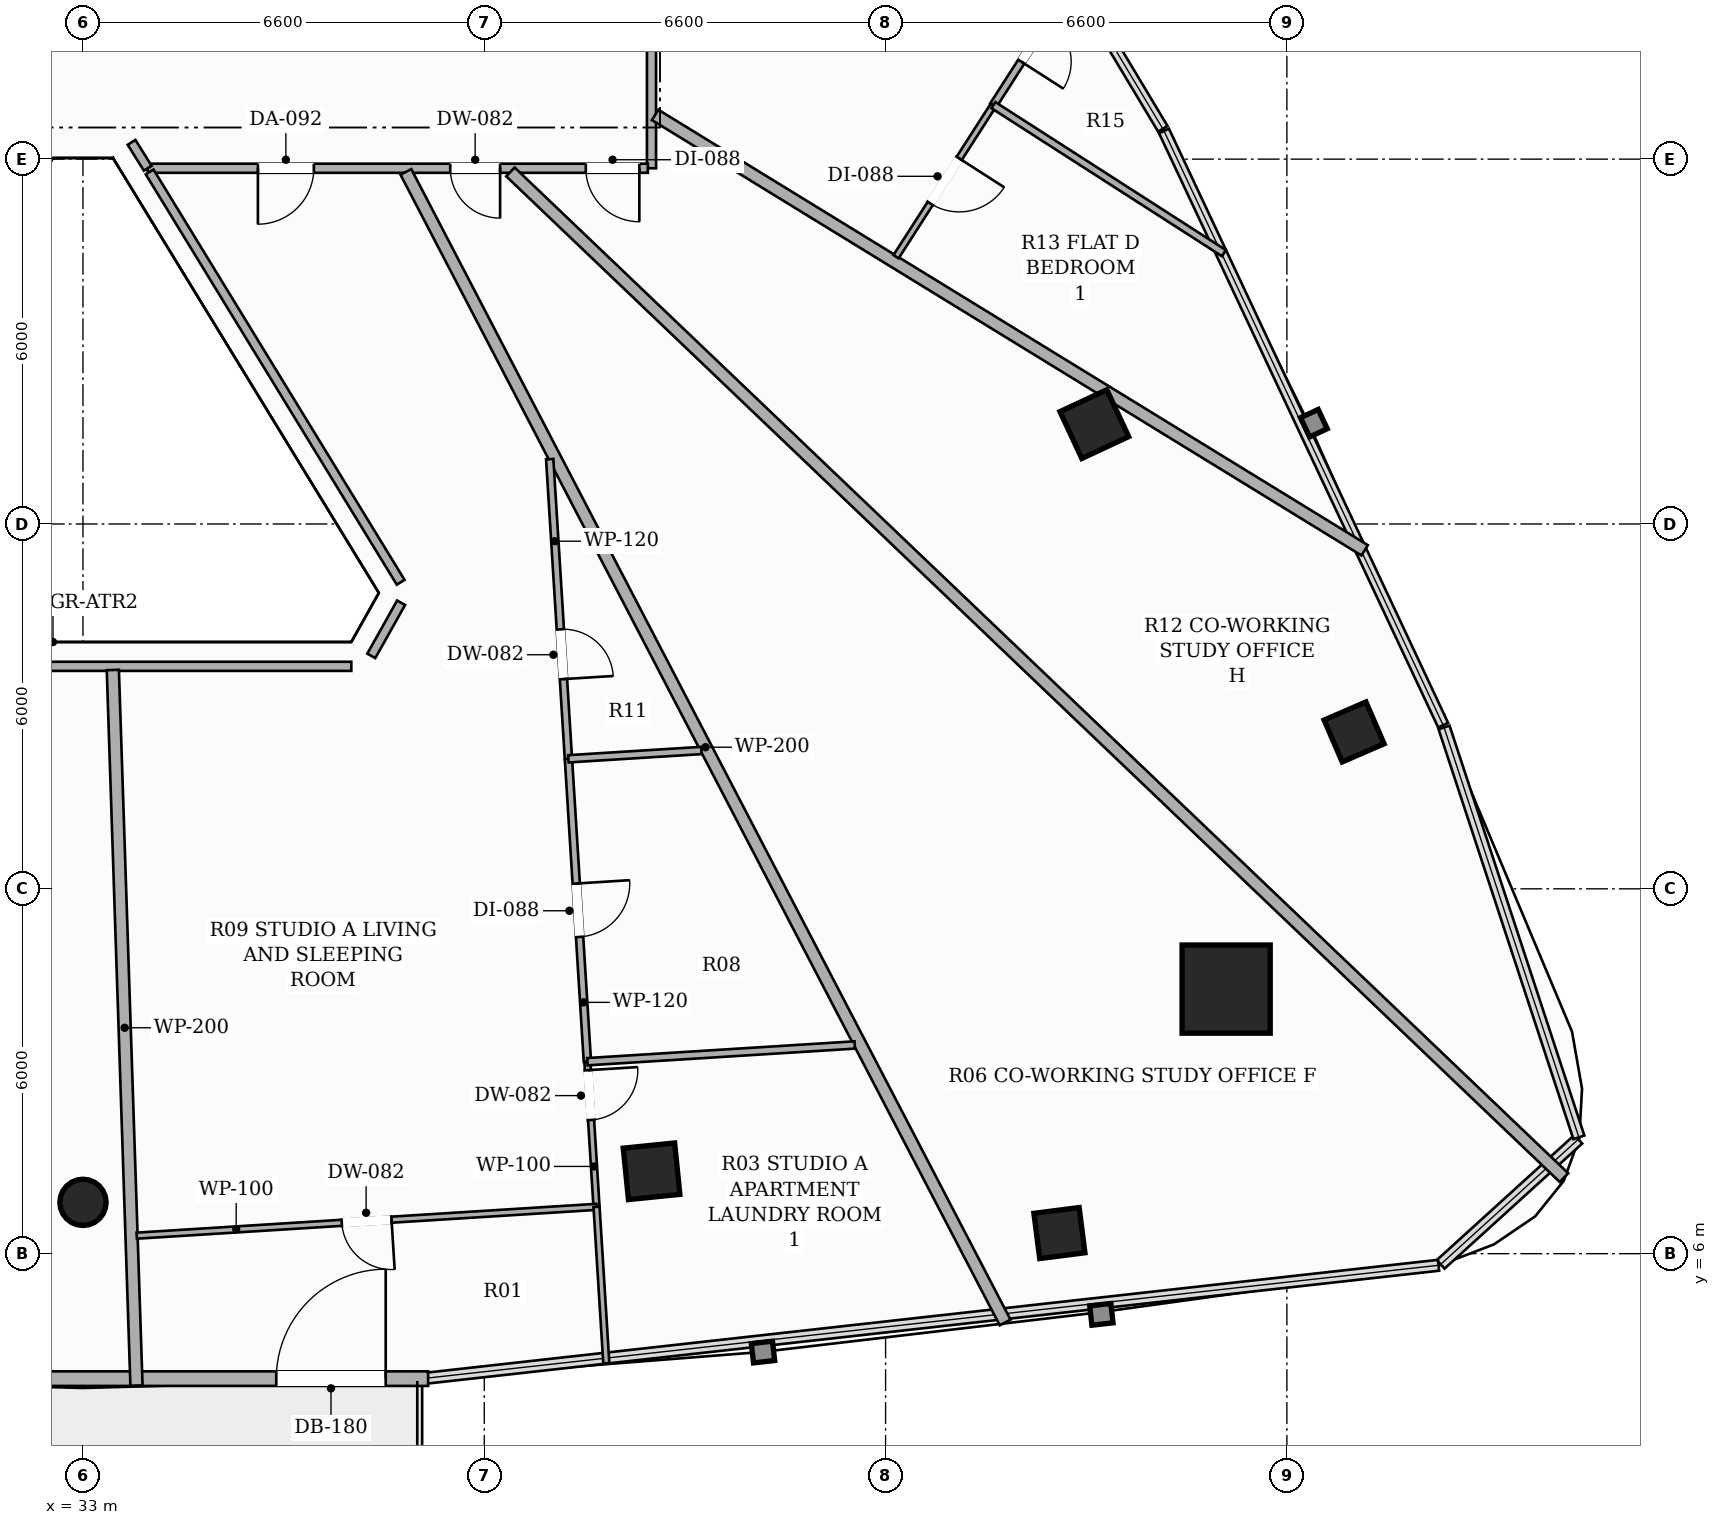
"""IFC4 building model, lengths in metres.
Left out: names, types, materials, properties, quantities, classifications, styles, units other than length and angle.
Written with IfcOpenShell. Run it as: python <this file> out.ifc"""

import sys

from ifc_helpers import new_model, si_unit, direction, frame, frame_2d, origin, origin_2d, place, context, subcontext, project, spatial, rectangle, hollow_rectangle, hollow_circle, extrude, element, fill, save


model = new_model("IFC4")
c1 = context("Model", 3, precision=1e-05, world=origin(), true_north=direction((0.0, 1.0)))
c2 = subcontext(c1, "Body", "Model", "MODEL_VIEW")
j1 = project(units=[si_unit("LENGTHUNIT", "METRE"), si_unit("PLANEANGLEUNIT", "RADIAN")], contexts=[c1])
p1 = place(None, origin())
s1 = spatial("IfcSite", under=j1, at=p1, CompositionType="ELEMENT")
p2 = place(p1, origin())
s2 = spatial("IfcBuilding", under=s1, at=p2, CompositionType="ELEMENT")
p3 = place(p2, frame((0.0, 0.0, 170.45)))
s3 = spatial("IfcBuildingStorey", under=s2, at=p3, CompositionType="ELEMENT", Elevation=170.45)
p4 = place(p3, frame((51.801, 10.351, 0.0), z_axis=(0.0, 0.0, 1.0), x_axis=(1.0, 0.0, 0.0)))
e1 = element("IfcColumn", 1, at=p4, inside=s3, PredefinedType="COLUMN", context=c2, shape_type="SweptSolid", body=[
    extrude(hollow_rectangle(XDim=1.45, YDim=1.45, WallThickness=0.045, at=origin_2d()), origin(), (0.0, 0.0, 1.0), 3.3),
])
p5 = place(p3, frame((33.0, 6.844, 0.0), z_axis=(0.0, 0.0, 1.0), x_axis=(1.0, 0.0, 0.0)))
e2 = element("IfcColumn", 2, at=p5, inside=s3, PredefinedType="COLUMN", context=c2, shape_type="SweptSolid", body=[
    extrude(hollow_circle(Radius=0.381, WallThickness=0.022, at=origin_2d()), origin(), (0.0, 0.0, 1.0), 3.3),
])
for number, where, z_axis, x_axis in (
    (3, (42.351, 7.355, 0.0), (0.0, 0.0, 1.0), (0.995, 0.101, 0.0)),
    (4, (49.633, 19.642, 0.0), (0.0, 0.0, 1.0), (-0.423, 0.906, 0.0)),
):
    element("IfcColumn", number, at=place(p3, frame(where, z_axis=z_axis, x_axis=x_axis)), inside=s3, PredefinedType="COLUMN", context=c2, shape_type="SweptSolid", body=[
        extrude(hollow_rectangle(XDim=0.85, YDim=0.85, WallThickness=0.028, at=origin_2d()), origin(), (0.0, 0.0, 1.0), 3.3),
    ])
for number, where, z_axis, x_axis in (
    (5, (49.059, 6.339, 0.0), (0.0, 0.0, 1.0), (0.992, 0.127, 0.0)),
    (6, (53.905, 14.58, 0.0), (0.0, 0.0, 1.0), (-0.397, 0.918, 0.0)),
):
    element("IfcColumn", number, at=place(p3, frame(where, z_axis=z_axis, x_axis=x_axis)), inside=s3, PredefinedType="COLUMN", context=c2, shape_type="SweptSolid", body=[
        extrude(hollow_rectangle(XDim=0.75, YDim=0.75, WallThickness=0.025, at=origin_2d()), origin(), (0.0, 0.0, 1.0), 3.3),
    ])
p6 = place(p3, frame((27.324, 3.945, 0.0), z_axis=(0.0, 0.0, 1.0), x_axis=(1.0, 0.0, 0.0)))
e7 = element("IfcWall", 7, at=p6, inside=s3, PredefinedType="SOLIDWALL", context=c2, shape_type="SweptSolid", body=[
    extrude(rectangle(XDim=11.352, YDim=0.24, at=frame_2d((5.676, 0.0))), origin(), (0.0, 0.0, 1.0), 2.624),
])
p7 = place(p6, frame((8.855, 0.0, 0.0)))
e8 = element("IfcOpeningElement", 8, at=p7, cuts=e7, PredefinedType="OPENING", context=c2, shape_type="SweptSolid", body=[
    extrude(rectangle(XDim=1.8, YDim=2.2, at=frame_2d((0.9, 1.1))), frame((0.0, 0.13, 0.0), z_axis=(0.0, -1.0, 0.0), x_axis=(1.0, 0.0, 0.0)), (0.0, 0.0, 1.0), 0.26),
])
p8 = place(p3, frame((42.35, 28.34, 0.0), z_axis=(0.0, 0.0, 1.0), x_axis=(0.0, -1.0, 0.0)))
e9 = element("IfcWall", 9, at=p8, inside=s3, PredefinedType="PARTITIONING", context=c2, shape_type="SweptSolid", body=[
    extrude(rectangle(XDim=4.49, YDim=0.15, at=frame_2d((2.245, 0.0))), origin(), (0.0, 0.0, 1.0), 2.721),
])
p9 = place(p8, frame((1.497, 0.0, 0.0)))
e10 = element("IfcOpeningElement", 10, at=p9, cuts=e9, PredefinedType="OPENING", context=c2, shape_type="SweptSolid", body=[
    extrude(rectangle(XDim=0.92, YDim=2.15, at=frame_2d((0.46, 1.075))), frame((0.0, 0.085, 0.0), z_axis=(0.0, -1.0, 0.0), x_axis=(1.0, 0.0, 0.0)), (0.0, 0.0, 1.0), 0.17),
])
p10 = place(p3, frame((42.29, 23.85, 0.0), z_axis=(0.0, 0.0, 1.0), x_axis=(-1.0, 0.0, 0.0)))
e11 = element("IfcWall", 11, at=p10, inside=s3, PredefinedType="PARTITIONING", context=c2, shape_type="SweptSolid", body=[
    extrude(rectangle(XDim=8.225, YDim=0.15, at=frame_2d((4.113, 0.0))), origin(), (0.0, 0.0, 1.0), 2.492),
])
p11 = place(p10, frame((5.493, 0.0, 0.0)))
e12 = element("IfcOpeningElement", 12, at=p11, cuts=e11, PredefinedType="OPENING", context=c2, shape_type="SweptSolid", body=[
    extrude(rectangle(XDim=0.92, YDim=2.15, at=frame_2d((0.46, 1.075))), frame((0.0, 0.085, 0.0), z_axis=(0.0, -1.0, 0.0), x_axis=(1.0, 0.0, 0.0)), (0.0, 0.0, 1.0), 0.17),
])
p12 = place(p10, frame((2.43, 0.0, 0.0)))
e13 = element("IfcOpeningElement", 13, at=p12, cuts=e11, PredefinedType="OPENING", context=c2, shape_type="SweptSolid", body=[
    extrude(rectangle(XDim=0.82, YDim=2.1, at=frame_2d((0.41, 1.05))), frame((0.0, 0.085, 0.0), z_axis=(0.0, -1.0, 0.0), x_axis=(1.0, 0.0, 0.0)), (0.0, 0.0, 1.0), 0.17),
])
p13 = place(p10, frame((0.14, 0.0, 0.0)))
e14 = element("IfcOpeningElement", 14, at=p13, cuts=e11, PredefinedType="OPENING", context=c2, shape_type="SweptSolid", body=[
    extrude(rectangle(XDim=0.88, YDim=2.1, at=frame_2d((0.44, 1.05))), frame((0.0, 0.085, 0.0), z_axis=(0.0, -1.0, 0.0), x_axis=(1.0, 0.0, 0.0)), (0.0, 0.0, 1.0), 0.17),
])
p14 = place(p3, frame((34.065, 23.85, 0.0), z_axis=(0.0, 0.0, 1.0), x_axis=(-0.529649150849, 0.84821682193, 0.0)))
e15 = element("IfcWall", 15, at=p14, inside=s3, PredefinedType="PARTITIONING", context=c2, shape_type="SweptSolid", body=[
    extrude(rectangle(XDim=0.502, YDim=0.15, at=frame_2d((0.251, 0.0))), origin(), (0.0, 0.0, 1.0), 3.06),
])
p15 = place(p3, frame((34.096, 23.79, 0.0), z_axis=(0.0, 0.0, 1.0), x_axis=(0.521886794995, -0.853014755564, 0.0)))
e16 = element("IfcWall", 16, at=p15, inside=s3, PredefinedType="PARTITIONING", context=c2, shape_type="SweptSolid", body=[
    extrude(rectangle(XDim=7.912, YDim=0.15, at=frame_2d((3.956, 0.0))), origin(), (0.0, 0.0, 1.0), 2.721),
])
p16 = place(p3, frame((38.232, 16.705, 0.0), z_axis=(0.0, 0.0, 1.0), x_axis=(-0.489011382175, -0.872277403183, 0.0)))
e17 = element("IfcWall", 17, at=p16, inside=s3, PredefinedType="PARTITIONING", context=c2, shape_type="SweptSolid", body=[
    extrude(rectangle(XDim=1.002, YDim=0.15, at=frame_2d((0.501, 0.0))), origin(), (0.0, 0.0, 1.0), 3.06),
])
p17 = place(p3, frame((37.413, 15.659, 0.0), z_axis=(0.0, 0.0, 1.0), x_axis=(-1.0, 0.0, 0.0)))
e18 = element("IfcWall", 18, at=p17, inside=s3, PredefinedType="PARTITIONING", context=c2, shape_type="SweptSolid", body=[
    extrude(rectangle(XDim=8.826, YDim=0.15, at=frame_2d((4.413, 0.0))), origin(), (0.0, 0.0, 1.0), 2.721),
])
p18 = place(p3, frame((33.88, 3.831, 0.0), z_axis=(0.0, 0.0, 1.0), x_axis=(-0.033030388285, 0.999454347857, 0.0)))
e19 = element("IfcWall", 19, at=p18, inside=s3, PredefinedType="PARTITIONING", context=c2, shape_type="SweptSolid", body=[
    extrude(rectangle(XDim=11.774, YDim=0.2, at=frame_2d((5.887, 0.0))), origin(), (0.0, 0.0, 1.0), 2.413),
])
p19 = place(p3, frame((38.311, 23.79, 0.0), z_axis=(0.0, 0.0, 1.0), x_axis=(0.461923729454, -0.886919651472, 0.0)))
e20 = element("IfcWall", 20, at=p19, inside=s3, PredefinedType="PARTITIONING", context=c2, shape_type="SweptSolid", body=[
    extrude(rectangle(XDim=21.335, YDim=0.2, at=frame_2d((10.667, 0.0))), origin(), (0.0, 0.0, 1.0), 2.413),
])
p20 = place(p3, frame((54.079, 17.567, 0.0), z_axis=(0.0, 0.0, 1.0), x_axis=(-0.852338446262, 0.5229906051, 0.0)))
e21 = element("IfcWall", 21, at=p20, inside=s3, PredefinedType="PARTITIONING", context=c2, shape_type="SweptSolid", body=[
    extrude(rectangle(XDim=13.691, YDim=0.2, at=frame_2d((6.845, 0.0))), origin(), (0.0, 0.0, 1.0), 2.413),
])
p21 = place(p3, frame((40.03, 23.79, 0.0), z_axis=(0.0, 0.0, 1.0), x_axis=(0.723360866179, -0.690470171174, 0.0)))
e22 = element("IfcWall", 22, at=p21, inside=s3, PredefinedType="PARTITIONING", context=c2, shape_type="SweptSolid", body=[
    extrude(rectangle(XDim=23.953, YDim=0.2, at=frame_2d((11.977, 0.0))), origin(), (0.0, 0.0, 1.0), 2.413),
])
p22 = place(p3, frame((40.676, 19.066, 0.0), z_axis=(0.0, 0.0, 1.0), x_axis=(0.062350581346, -0.998054309647, 0.0)))
e23 = element("IfcWall", 23, at=p22, inside=s3, PredefinedType="PARTITIONING", context=c2, shape_type="SweptSolid", body=[
    extrude(rectangle(XDim=4.938, YDim=0.12, at=frame_2d((2.469, 0.0))), origin(), (0.0, 0.0, 1.0), 2.721),
])
p23 = place(p22, frame((2.804, 0.0, 0.0)))
e24 = element("IfcOpeningElement", 24, at=p23, cuts=e23, PredefinedType="OPENING", context=c2, shape_type="SweptSolid", body=[
    extrude(rectangle(XDim=0.82, YDim=2.1, at=frame_2d((0.41, 1.05))), frame((0.0, 0.07, 0.0), z_axis=(0.0, -1.0, 0.0), x_axis=(1.0, 0.0, 0.0)), (0.0, 0.0, 1.0), 0.14),
])
p24 = place(p3, frame((40.984, 14.138, 0.0), z_axis=(0.0, 0.0, 1.0), x_axis=(0.062518380192, -0.998043812735, 0.0)))
e25 = element("IfcWall", 25, at=p24, inside=s3, PredefinedType="PARTITIONING", context=c2, shape_type="SweptSolid", body=[
    extrude(rectangle(XDim=4.991, YDim=0.12, at=frame_2d((2.495, 0.0))), origin(), (0.0, 0.0, 1.0), 2.721),
])
p25 = place(p24, frame((2.055, 0.0, 0.0)))
e26 = element("IfcOpeningElement", 26, at=p25, cuts=e25, PredefinedType="OPENING", context=c2, shape_type="SweptSolid", body=[
    extrude(rectangle(XDim=0.88, YDim=2.1, at=frame_2d((0.44, 1.05))), frame((0.0, 0.07, 0.0), z_axis=(0.0, -1.0, 0.0), x_axis=(1.0, 0.0, 0.0)), (0.0, 0.0, 1.0), 0.14),
])
p26 = place(p3, frame((41.296, 9.157, 0.0), z_axis=(0.0, 0.0, 1.0), x_axis=(0.062778653683, -0.998027474893, 0.0)))
e27 = element("IfcWall", 27, at=p26, inside=s3, PredefinedType="PARTITIONING", context=c2, shape_type="SweptSolid", body=[
    extrude(rectangle(XDim=2.392, YDim=0.1, at=frame_2d((1.196, 0.0))), origin(), (0.0, 0.0, 1.0), 2.413),
])
p27 = place(p26, frame((0.14, 0.0, 0.0)))
e28 = element("IfcOpeningElement", 28, at=p27, cuts=e27, PredefinedType="OPENING", context=c2, shape_type="SweptSolid", body=[
    extrude(rectangle(XDim=0.82, YDim=2.1, at=frame_2d((0.41, 1.05))), frame((0.0, 0.06, 0.0), z_axis=(0.0, -1.0, 0.0), x_axis=(1.0, 0.0, 0.0)), (0.0, 0.0, 1.0), 0.12),
])
p28 = place(p3, frame((41.446, 6.77, 0.0), z_axis=(0.0, 0.0, 1.0), x_axis=(-0.998040272182, -0.062574875979, 0.0)))
e29 = element("IfcWall", 29, at=p28, inside=s3, PredefinedType="PARTITIONING", context=c2, shape_type="SweptSolid", body=[
    extrude(rectangle(XDim=7.577, YDim=0.1, at=frame_2d((3.789, 0.0))), origin(), (0.0, 0.0, 1.0), 3.06),
])
p29 = place(p28, frame((3.378, 0.0, 0.0)))
e30 = element("IfcOpeningElement", 30, at=p29, cuts=e29, PredefinedType="OPENING", context=c2, shape_type="SweptSolid", body=[
    extrude(rectangle(XDim=0.82, YDim=2.1, at=frame_2d((0.41, 1.05))), frame((0.0, 0.06, 0.0), z_axis=(0.0, -1.0, 0.0), x_axis=(1.0, 0.0, 0.0)), (0.0, 0.0, 1.0), 0.12),
])
p30 = place(p3, frame((43.171, 14.275, 0.0), z_axis=(0.0, 0.0, 1.0), x_axis=(-0.998044767373, -0.062503138479, 0.0)))
e31 = element("IfcWall", 31, at=p30, inside=s3, PredefinedType="PARTITIONING", context=c2, shape_type="SweptSolid", body=[
    extrude(rectangle(XDim=2.191, YDim=0.12, at=frame_2d((1.096, 0.0))), origin(), (0.0, 0.0, 1.0), 2.721),
])
p31 = place(p3, frame((45.693, 9.432, 0.0), z_axis=(0.0, 0.0, 1.0), x_axis=(-0.998051500251, -0.062395535466, 0.0)))
e32 = element("IfcWall", 32, at=p31, inside=s3, PredefinedType="PARTITIONING", context=c2, shape_type="SweptSolid", body=[
    extrude(rectangle(XDim=4.406, YDim=0.12, at=frame_2d((2.203, 0.0))), origin(), (0.0, 0.0, 1.0), 2.721),
])
p32 = place(p3, frame((41.607, 4.198, 0.0), z_axis=(0.0, 0.0, 1.0), x_axis=(-0.062431368009, 0.99804925945, 0.0)))
e33 = element("IfcWall", 33, at=p32, inside=s3, PredefinedType="PARTITIONING", context=c2, shape_type="SweptSolid", body=[
    extrude(rectangle(XDim=2.577, YDim=0.1, at=frame_2d((1.289, 0.0))), origin(), (0.0, 0.0, 1.0), 3.06),
])
p33 = place(p3, frame((49.335, 27.008, 0.0), z_axis=(0.0, 0.0, 1.0), x_axis=(-0.540512736599, -0.841335831624, 0.0)))
e34 = element("IfcWall", 34, at=p33, inside=s3, PredefinedType="PARTITIONING", context=c2, shape_type="SweptSolid", body=[
    extrude(rectangle(XDim=2.52, YDim=0.12, at=frame_2d((1.26, 0.0))), origin(), (0.0, 0.0, 1.0), 3.06),
])
p34 = place(p33, frame((0.85, 0.0, 0.0)))
e35 = element("IfcOpeningElement", 35, at=p34, cuts=e34, PredefinedType="OPENING", context=c2, shape_type="SweptSolid", body=[
    extrude(rectangle(XDim=0.82, YDim=2.1, at=frame_2d((0.41, 1.05))), frame((0.0, 0.07, 0.0), z_axis=(0.0, -1.0, 0.0), x_axis=(1.0, 0.0, 0.0)), (0.0, 0.0, 1.0), 0.14),
])
p35 = place(p3, frame((47.973, 24.888, 0.0), z_axis=(0.0, 0.0, 1.0), x_axis=(-0.54033686579, -0.841448793135, 0.0)))
e36 = element("IfcWall", 36, at=p35, inside=s3, PredefinedType="PARTITIONING", context=c2, shape_type="SweptSolid", body=[
    extrude(rectangle(XDim=2.963, YDim=0.1, at=frame_2d((1.481, 0.0))), origin(), (0.0, 0.0, 1.0), 2.413),
])
p36 = place(p35, frame((1.041, 0.0, 0.0)))
e37 = element("IfcOpeningElement", 37, at=p36, cuts=e36, PredefinedType="OPENING", context=c2, shape_type="SweptSolid", body=[
    extrude(rectangle(XDim=0.88, YDim=2.1, at=frame_2d((0.44, 1.05))), frame((0.0, 0.06, 0.0), z_axis=(0.0, -1.0, 0.0), x_axis=(1.0, 0.0, 0.0)), (0.0, 0.0, 1.0), 0.12),
])
p37 = place(p3, frame((51.765, 22.453, 0.0), z_axis=(0.0, 0.0, 1.0), x_axis=(-0.841445922542, 0.540341336044, 0.0)))
e38 = element("IfcWall", 38, at=p37, inside=s3, PredefinedType="PARTITIONING", context=c2, shape_type="SweptSolid", body=[
    extrude(rectangle(XDim=4.507, YDim=0.12, at=frame_2d((2.253, 0.0))), origin(), (0.0, 0.0, 1.0), 3.06),
])
p38 = place(p7, origin())
e39 = element("IfcDoor", 39, at=p38, inside=s3, OperationType="SINGLE_SWING_RIGHT", PredefinedType="DOOR", context=c2, shape_type="SweptSolid", body=[
    extrude(rectangle(XDim=1.8, YDim=2.2, at=frame_2d((0.9, 1.1))), frame((0.0, 0.025, 0.0), z_axis=(0.0, -1.0, 0.0), x_axis=(1.0, 0.0, 0.0)), (0.0, 0.0, 1.0), 0.05),
])
fill(e8, e39)
p39 = place(p11, origin())
e40 = element("IfcDoor", 40, at=p39, inside=s3, OperationType="SINGLE_SWING_RIGHT", PredefinedType="DOOR", context=c2, shape_type="SweptSolid", body=[
    extrude(rectangle(XDim=0.92, YDim=2.15, at=frame_2d((0.46, 1.075))), frame((0.0, 0.025, 0.0), z_axis=(0.0, -1.0, 0.0), x_axis=(1.0, 0.0, 0.0)), (0.0, 0.0, 1.0), 0.05),
])
fill(e12, e40)
p40 = place(p23, origin())
e41 = element("IfcDoor", 41, at=p40, inside=s3, OperationType="SINGLE_SWING_RIGHT", PredefinedType="DOOR", context=c2, shape_type="SweptSolid", body=[
    extrude(rectangle(XDim=0.82, YDim=2.1, at=frame_2d((0.41, 1.05))), frame((0.0, 0.025, 0.0), z_axis=(0.0, -1.0, 0.0), x_axis=(1.0, 0.0, 0.0)), (0.0, 0.0, 1.0), 0.05),
])
fill(e24, e41)
p41 = place(p25, origin())
e42 = element("IfcDoor", 42, at=p41, inside=s3, OperationType="SINGLE_SWING_LEFT", PredefinedType="DOOR", context=c2, shape_type="SweptSolid", body=[
    extrude(rectangle(XDim=0.88, YDim=2.1, at=frame_2d((0.44, 1.05))), frame((0.0, 0.025, 0.0), z_axis=(0.0, -1.0, 0.0), x_axis=(1.0, 0.0, 0.0)), (0.0, 0.0, 1.0), 0.05),
])
fill(e26, e42)
p42 = place(p27, origin())
e43 = element("IfcDoor", 43, at=p42, inside=s3, OperationType="SINGLE_SWING_LEFT", PredefinedType="DOOR", context=c2, shape_type="SweptSolid", body=[
    extrude(rectangle(XDim=0.82, YDim=2.1, at=frame_2d((0.41, 1.05))), frame((0.0, 0.025, 0.0), z_axis=(0.0, -1.0, 0.0), x_axis=(1.0, 0.0, 0.0)), (0.0, 0.0, 1.0), 0.05),
])
fill(e28, e43)
p43 = place(p29, origin())
e44 = element("IfcDoor", 44, at=p43, inside=s3, OperationType="SINGLE_SWING_LEFT", PredefinedType="DOOR", context=c2, shape_type="SweptSolid", body=[
    extrude(rectangle(XDim=0.82, YDim=2.1, at=frame_2d((0.41, 1.05))), frame((0.0, 0.025, 0.0), z_axis=(0.0, -1.0, 0.0), x_axis=(1.0, 0.0, 0.0)), (0.0, 0.0, 1.0), 0.05),
])
fill(e30, e44)
p44 = place(p34, origin())
e45 = element("IfcDoor", 45, at=p44, inside=s3, OperationType="SINGLE_SWING_RIGHT", PredefinedType="DOOR", context=c2, shape_type="SweptSolid", body=[
    extrude(rectangle(XDim=0.82, YDim=2.1, at=frame_2d((0.41, 1.05))), frame((0.0, 0.025, 0.0), z_axis=(0.0, -1.0, 0.0), x_axis=(1.0, 0.0, 0.0)), (0.0, 0.0, 1.0), 0.05),
])
fill(e35, e45)
p45 = place(p36, origin())
e46 = element("IfcDoor", 46, at=p45, inside=s3, OperationType="SINGLE_SWING_LEFT", PredefinedType="DOOR", context=c2, shape_type="SweptSolid", body=[
    extrude(rectangle(XDim=0.88, YDim=2.1, at=frame_2d((0.44, 1.05))), frame((0.0, 0.025, 0.0), z_axis=(0.0, -1.0, 0.0), x_axis=(1.0, 0.0, 0.0)), (0.0, 0.0, 1.0), 0.05),
])
fill(e37, e46)
p46 = place(p12, origin())
e47 = element("IfcDoor", 47, at=p46, inside=s3, OperationType="SINGLE_SWING_LEFT", PredefinedType="DOOR", context=c2, shape_type="SweptSolid", body=[
    extrude(rectangle(XDim=0.82, YDim=2.1, at=frame_2d((0.41, 1.05))), frame((0.0, 0.025, 0.0), z_axis=(0.0, -1.0, 0.0), x_axis=(1.0, 0.0, 0.0)), (0.0, 0.0, 1.0), 0.05),
])
fill(e13, e47)
p47 = place(p13, origin())
e48 = element("IfcDoor", 48, at=p47, inside=s3, OperationType="SINGLE_SWING_LEFT", PredefinedType="DOOR", context=c2, shape_type="SweptSolid", body=[
    extrude(rectangle(XDim=0.88, YDim=2.1, at=frame_2d((0.44, 1.05))), frame((0.0, 0.025, 0.0), z_axis=(0.0, -1.0, 0.0), x_axis=(1.0, 0.0, 0.0)), (0.0, 0.0, 1.0), 0.05),
])
fill(e14, e48)
save(model, sys.argv[1])
